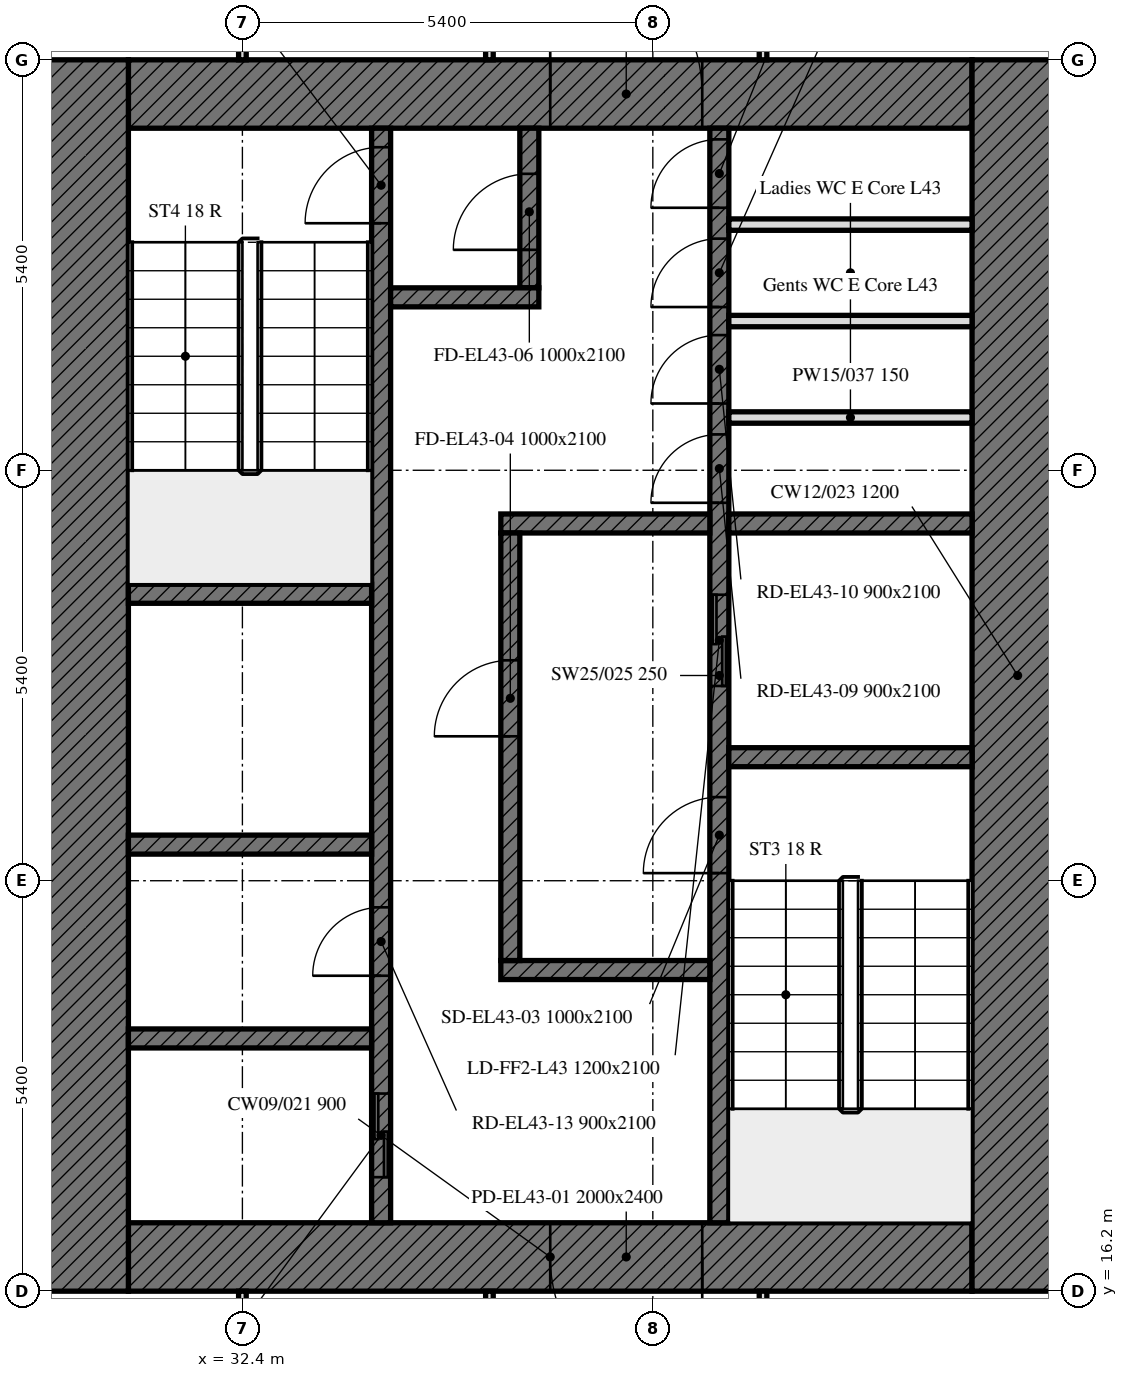
"""IFC4 building model, lengths in metres.
Left out: names, types, materials, properties, quantities, classifications, styles, units other than length and angle.
Written with IfcOpenShell. Run it as: python <this file> out.ifc"""

import sys

from ifc_helpers import new_model, si_unit, direction, frame, frame_2d, origin, place, context, subcontext, project, spatial, rectangle, extrude, element, fill, save


model = new_model("IFC4")
c1 = context("Model", 3, precision=1e-05, world=origin(), true_north=direction((0.0, 1.0)))
c2 = subcontext(c1, "Body", "Model", "MODEL_VIEW")
j1 = project(units=[si_unit("LENGTHUNIT", "METRE"), si_unit("PLANEANGLEUNIT", "RADIAN")], contexts=[c1])
p1 = place(None, origin())
s1 = spatial("IfcSite", under=j1, at=p1, CompositionType="ELEMENT")
p2 = place(p1, origin())
s2 = spatial("IfcBuilding", under=s1, at=p2, CompositionType="ELEMENT")
p3 = place(p2, frame((0.0, 0.0, 180.7)))
s3 = spatial("IfcBuildingStorey", under=s2, at=p3, CompositionType="ELEMENT", Elevation=180.7)
p4 = place(p3, frame((42.0, 16.65, 0.0), z_axis=(0.0, 0.0, 1.0), x_axis=(-1.0, 0.0, 0.0)))
e1 = element("IfcWall", 1, at=p4, inside=s3, PredefinedType="SOLIDWALL", context=c2, shape_type="SweptSolid", body=[
    extrude(rectangle(XDim=11.1, YDim=0.9, at=frame_2d((5.55, 0.0))), origin(), (0.0, 0.0, 1.0), 3.0),
])
p5 = place(p4, frame((3.55, 0.0, 0.0)))
e2 = element("IfcOpeningElement", 2, at=p5, cuts=e1, PredefinedType="OPENING", context=c2, shape_type="SweptSolid", body=[
    extrude(rectangle(XDim=2.0, YDim=2.4, at=frame_2d((1.0, 1.2))), frame((0.0, 0.45, 0.0), z_axis=(0.0, -1.0, 0.0), x_axis=(1.0, 0.0, 0.0)), (0.0, 0.0, 1.0), 0.9),
])
p6 = place(p3, frame((30.9, 31.95, 0.0), z_axis=(0.0, 0.0, 1.0), x_axis=(1.0, 0.0, 0.0)))
e3 = element("IfcWall", 3, at=p6, inside=s3, PredefinedType="SOLIDWALL", context=c2, shape_type="SweptSolid", body=[
    extrude(rectangle(XDim=11.1, YDim=0.9, at=frame_2d((5.55, 0.0))), origin(), (0.0, 0.0, 1.0), 3.0),
])
p7 = place(p6, frame((5.55, 0.0, 0.0)))
e4 = element("IfcOpeningElement", 4, at=p7, cuts=e3, PredefinedType="OPENING", context=c2, shape_type="SweptSolid", body=[
    extrude(rectangle(XDim=2.0, YDim=2.4, at=frame_2d((1.0, 1.2))), frame((0.0, 0.45, 0.0), z_axis=(0.0, -1.0, 0.0), x_axis=(1.0, 0.0, 0.0)), (0.0, 0.0, 1.0), 0.9),
])
for number, where, z_axis, x_axis in (
    (5, (42.6, 32.4, 0.0), (0.0, 0.0, 1.0), (0.0, -1.0, 0.0)),
    (6, (30.3, 16.2, 0.0), (0.0, 0.0, 1.0), (0.0, 1.0, 0.0)),
):
    element("IfcWall", number, at=place(p3, frame(where, z_axis=z_axis, x_axis=x_axis)), inside=s3, PredefinedType="SOLIDWALL", context=c2, shape_type="SweptSolid", body=[
        extrude(rectangle(XDim=16.2, YDim=1.2, at=frame_2d((8.1, 0.0))), origin(), (0.0, 0.0, 1.0), 3.0),
    ])
p8 = place(p3, frame((38.675, 17.1, 0.0), z_axis=(0.0, 0.0, 1.0), x_axis=(0.0, 1.0, 0.0)))
e7 = element("IfcWall", 7, at=p8, inside=s3, PredefinedType="SOLIDWALL", context=c2, shape_type="SweptSolid", body=[
    extrude(rectangle(XDim=14.4, YDim=0.25, at=frame_2d((7.2, 0.0))), origin(), (0.0, 0.0, 1.0), 3.0),
])
p9 = place(p8, frame((4.6, 0.0, 0.0)))
e8 = element("IfcOpeningElement", 8, at=p9, cuts=e7, PredefinedType="OPENING", context=c2, shape_type="SweptSolid", body=[
    extrude(rectangle(XDim=1.0, YDim=2.1, at=frame_2d((0.5, 1.05))), frame((0.0, 0.125, 0.0), z_axis=(0.0, -1.0, 0.0), x_axis=(1.0, 0.0, 0.0)), (0.0, 0.0, 1.0), 0.25),
])
p10 = place(p8, frame((7.062, 0.0, 0.0)))
e9 = element("IfcOpeningElement", 9, at=p10, cuts=e7, PredefinedType="OPENING", context=c2, shape_type="SweptSolid", body=[
    extrude(rectangle(XDim=1.2, YDim=2.1, at=frame_2d((0.6, 1.05))), frame((0.0, 0.125, 0.0), z_axis=(0.0, -1.0, 0.0), x_axis=(1.0, 0.0, 0.0)), (0.0, 0.0, 1.0), 0.25),
])
p11 = place(p8, frame((9.472, 0.0, 0.0)))
e10 = element("IfcOpeningElement", 10, at=p11, cuts=e7, PredefinedType="OPENING", context=c2, shape_type="SweptSolid", body=[
    extrude(rectangle(XDim=0.9, YDim=2.1, at=frame_2d((0.45, 1.05))), frame((0.0, 0.125, 0.0), z_axis=(0.0, -1.0, 0.0), x_axis=(1.0, 0.0, 0.0)), (0.0, 0.0, 1.0), 0.25),
])
p12 = place(p8, frame((10.779, 0.0, 0.0)))
e11 = element("IfcOpeningElement", 11, at=p12, cuts=e7, PredefinedType="OPENING", context=c2, shape_type="SweptSolid", body=[
    extrude(rectangle(XDim=0.9, YDim=2.1, at=frame_2d((0.45, 1.05))), frame((0.0, 0.125, 0.0), z_axis=(0.0, -1.0, 0.0), x_axis=(1.0, 0.0, 0.0)), (0.0, 0.0, 1.0), 0.25),
])
p13 = place(p8, frame((12.048, 0.0, 0.0)))
e12 = element("IfcOpeningElement", 12, at=p13, cuts=e7, PredefinedType="OPENING", context=c2, shape_type="SweptSolid", body=[
    extrude(rectangle(XDim=0.9, YDim=2.1, at=frame_2d((0.45, 1.05))), frame((0.0, 0.125, 0.0), z_axis=(0.0, -1.0, 0.0), x_axis=(1.0, 0.0, 0.0)), (0.0, 0.0, 1.0), 0.25),
])
p14 = place(p8, frame((13.354, 0.0, 0.0)))
e13 = element("IfcOpeningElement", 13, at=p14, cuts=e7, PredefinedType="OPENING", context=c2, shape_type="SweptSolid", body=[
    extrude(rectangle(XDim=0.9, YDim=2.1, at=frame_2d((0.45, 1.05))), frame((0.0, 0.125, 0.0), z_axis=(0.0, -1.0, 0.0), x_axis=(1.0, 0.0, 0.0)), (0.0, 0.0, 1.0), 0.25),
])
p15 = place(p3, frame((34.225, 17.1, 0.0), z_axis=(0.0, 0.0, 1.0), x_axis=(0.0, 1.0, 0.0)))
e14 = element("IfcWall", 14, at=p15, inside=s3, PredefinedType="SOLIDWALL", context=c2, shape_type="SweptSolid", body=[
    extrude(rectangle(XDim=14.4, YDim=0.25, at=frame_2d((7.2, 0.0))), origin(), (0.0, 0.0, 1.0), 3.0),
])
p16 = place(p15, frame((13.15, 0.0, 0.0)))
e15 = element("IfcOpeningElement", 15, at=p16, cuts=e14, PredefinedType="OPENING", context=c2, shape_type="SweptSolid", body=[
    extrude(rectangle(XDim=1.0, YDim=2.1, at=frame_2d((0.5, 1.05))), frame((0.0, 0.125, 0.0), z_axis=(0.0, -1.0, 0.0), x_axis=(1.0, 0.0, 0.0)), (0.0, 0.0, 1.0), 0.25),
])
p17 = place(p15, frame((0.6, 0.0, 0.0)))
e16 = element("IfcOpeningElement", 16, at=p17, cuts=e14, PredefinedType="OPENING", context=c2, shape_type="SweptSolid", body=[
    extrude(rectangle(XDim=1.1, YDim=2.1, at=frame_2d((0.55, 1.05))), frame((0.0, 0.125, 0.0), z_axis=(0.0, -1.0, 0.0), x_axis=(1.0, 0.0, 0.0)), (0.0, 0.0, 1.0), 0.25),
])
p18 = place(p15, frame((3.25, 0.0, 0.0)))
e17 = element("IfcOpeningElement", 17, at=p18, cuts=e14, PredefinedType="OPENING", context=c2, shape_type="SweptSolid", body=[
    extrude(rectangle(XDim=0.9, YDim=2.1, at=frame_2d((0.45, 1.05))), frame((0.0, 0.125, 0.0), z_axis=(0.0, -1.0, 0.0), x_axis=(1.0, 0.0, 0.0)), (0.0, 0.0, 1.0), 0.25),
])
p19 = place(p3, frame((38.8, 23.225, 0.0), z_axis=(0.0, 0.0, 1.0), x_axis=(1.0, 0.0, 0.0)))
e18 = element("IfcWall", 18, at=p19, inside=s3, PredefinedType="SOLIDWALL", context=c2, shape_type="SweptSolid", body=[
    extrude(rectangle(XDim=3.2, YDim=0.25, at=frame_2d((1.6, 0.0))), origin(), (0.0, 0.0, 1.0), 3.0),
])
for number, where, z_axis, x_axis in (
    (19, (30.9, 25.375, 0.0), (0.0, 0.0, 1.0), (1.0, 0.0, 0.0)),
    (20, (30.9, 22.075, 0.0), (0.0, 0.0, 1.0), (1.0, 0.0, 0.0)),
):
    element("IfcWall", number, at=place(p3, frame(where, z_axis=z_axis, x_axis=x_axis)), inside=s3, PredefinedType="SOLIDWALL", context=c2, shape_type="SweptSolid", body=[
        extrude(rectangle(XDim=3.2, YDim=0.25, at=frame_2d((1.6, 0.0))), origin(), (0.0, 0.0, 1.0), 3.0),
    ])
p20 = place(p3, frame((38.8, 26.3, 0.0), z_axis=(0.0, 0.0, 1.0), x_axis=(1.0, 0.0, 0.0)))
e21 = element("IfcWall", 21, at=p20, inside=s3, PredefinedType="SOLIDWALL", context=c2, shape_type="SweptSolid", body=[
    extrude(rectangle(XDim=3.2, YDim=0.25, at=frame_2d((1.6, 0.0))), origin(), (0.0, 0.0, 1.0), 3.0),
])
for number, where, z_axis, x_axis in (
    (22, (35.8, 26.3, 0.0), (0.0, 0.0, 1.0), (1.0, 0.0, 0.0)),
    (23, (35.8, 20.425, 0.0), (0.0, 0.0, 1.0), (1.0, 0.0, 0.0)),
):
    element("IfcWall", number, at=place(p3, frame(where, z_axis=z_axis, x_axis=x_axis)), inside=s3, PredefinedType="SOLIDWALL", context=c2, shape_type="SweptSolid", body=[
        extrude(rectangle(XDim=2.75, YDim=0.25, at=frame_2d((1.375, 0.0))), origin(), (0.0, 0.0, 1.0), 3.0),
    ])
p21 = place(p3, frame((36.175, 29.4, 0.0), z_axis=(0.0, 0.0, 1.0), x_axis=(0.0, 1.0, 0.0)))
e24 = element("IfcWall", 24, at=p21, inside=s3, PredefinedType="SOLIDWALL", context=c2, shape_type="SweptSolid", body=[
    extrude(rectangle(XDim=2.1, YDim=0.25, at=frame_2d((1.05, 0.0))), origin(), (0.0, 0.0, 1.0), 3.0),
])
p22 = place(p21, frame((0.5, 0.0, 0.0)))
e25 = element("IfcOpeningElement", 25, at=p22, cuts=e24, PredefinedType="OPENING", context=c2, shape_type="SweptSolid", body=[
    extrude(rectangle(XDim=1.0, YDim=2.1, at=frame_2d((0.5, 1.05))), frame((0.0, 0.125, 0.0), z_axis=(0.0, -1.0, 0.0), x_axis=(1.0, 0.0, 0.0)), (0.0, 0.0, 1.0), 0.25),
])
p23 = place(p3, frame((34.35, 29.275, 0.0), z_axis=(0.0, 0.0, 1.0), x_axis=(1.0, 0.0, 0.0)))
e26 = element("IfcWall", 26, at=p23, inside=s3, PredefinedType="SOLIDWALL", context=c2, shape_type="SweptSolid", body=[
    extrude(rectangle(XDim=1.95, YDim=0.25, at=frame_2d((0.975, 0.0))), origin(), (0.0, 0.0, 1.0), 3.0),
])
p24 = place(p3, frame((35.925, 20.55, 0.0), z_axis=(0.0, 0.0, 1.0), x_axis=(0.0, 1.0, 0.0)))
e27 = element("IfcWall", 27, at=p24, inside=s3, PredefinedType="SOLIDWALL", context=c2, shape_type="SweptSolid", body=[
    extrude(rectangle(XDim=5.625, YDim=0.25, at=frame_2d((2.812, 0.0))), origin(), (0.0, 0.0, 1.0), 3.0),
])
p25 = place(p24, frame((2.95, 0.0, 0.0)))
e28 = element("IfcOpeningElement", 28, at=p25, cuts=e27, PredefinedType="OPENING", context=c2, shape_type="SweptSolid", body=[
    extrude(rectangle(XDim=1.0, YDim=2.1, at=frame_2d((0.5, 1.05))), frame((0.0, 0.125, 0.0), z_axis=(0.0, -1.0, 0.0), x_axis=(1.0, 0.0, 0.0)), (0.0, 0.0, 1.0), 0.25),
])
p26 = place(p3, frame((30.9, 19.525, 0.0), z_axis=(0.0, 0.0, 1.0), x_axis=(1.0, 0.0, 0.0)))
e29 = element("IfcWall", 29, at=p26, inside=s3, PredefinedType="SOLIDWALL", context=c2, shape_type="SweptSolid", body=[
    extrude(rectangle(XDim=3.2, YDim=0.25, at=frame_2d((1.6, 0.0))), origin(), (0.0, 0.0, 1.0), 3.0),
])
for number, where, z_axis, x_axis in (
    (30, (38.8, 27.694, 0.0), (0.0, 0.0, 1.0), (1.0, 0.0, 0.0)),
    (31, (38.8, 28.963, 0.0), (0.0, 0.0, 1.0), (1.0, 0.0, 0.0)),
    (32, (38.8, 30.232, 0.0), (0.0, 0.0, 1.0), (1.0, 0.0, 0.0)),
):
    element("IfcWall", number, at=place(p3, frame(where, z_axis=z_axis, x_axis=x_axis)), inside=s3, PredefinedType="PARTITIONING", context=c2, shape_type="SweptSolid", body=[
        extrude(rectangle(XDim=3.2, YDim=0.15, at=frame_2d((1.6, 0.0))), origin(), (0.0, 0.0, 1.0), 3.0),
    ])
p27 = place(p3, frame((32.4, 32.4, 0.0), z_axis=(0.0, 0.0, 1.0), x_axis=(0.0, 1.0, 0.0)))
e33 = element("IfcWall", 33, at=p27, inside=s3, PredefinedType="PARTITIONING", context=c2, shape_type="SweptSolid", body=[
    extrude(rectangle(XDim=4.98, YDim=0.1, at=frame_2d((2.49, 0.0))), origin(), (0.0, 0.0, 1.0), 2.4),
])
for number, where, z_axis, x_axis in (
    (34, (39.25, 32.4, 0.0), (0.0, 0.0, 1.0), (0.0, 1.0, 0.0)),
    (35, (35.65, 38.625, 0.0), (0.0, 0.0, 1.0), (0.0, -1.0, 0.0)),
):
    element("IfcWall", number, at=place(p3, frame(where, z_axis=z_axis, x_axis=x_axis)), inside=s3, PredefinedType="PARTITIONING", context=c2, shape_type="SweptSolid", body=[
        extrude(rectangle(XDim=6.225, YDim=0.1, at=frame_2d((3.113, 0.0))), origin(), (0.0, 0.0, 1.0), 2.4),
    ])
for number, where, z_axis, x_axis in (
    (36, (32.4, 13.575, 0.0), (0.0, 0.0, 1.0), (0.0, 1.0, 0.0)),
    (37, (35.65, 16.2, 0.0), (0.0, 0.0, 1.0), (0.0, -1.0, 0.0)),
    (38, (39.25, 13.575, 0.0), (0.0, 0.0, 1.0), (0.0, 1.0, 0.0)),
):
    element("IfcWall", number, at=place(p3, frame(where, z_axis=z_axis, x_axis=x_axis)), inside=s3, PredefinedType="PARTITIONING", context=c2, shape_type="SweptSolid", body=[
        extrude(rectangle(XDim=2.625, YDim=0.1, at=frame_2d((1.312, 0.0))), origin(), (0.0, 0.0, 1.0), 3.0),
    ])
p28 = place(p5, origin())
e39 = element("IfcDoor", 39, at=p28, inside=s3, OperationType="DOUBLE_DOOR_SINGLE_SWING", PredefinedType="DOOR", context=c2, shape_type="SweptSolid", body=[
    extrude(rectangle(XDim=2.0, YDim=2.4, at=frame_2d((1.0, 1.2))), frame((0.0, 0.025, 0.0), z_axis=(0.0, -1.0, 0.0), x_axis=(1.0, 0.0, 0.0)), (0.0, 0.0, 1.0), 0.05),
])
fill(e2, e39)
p29 = place(p7, origin())
e40 = element("IfcDoor", 40, at=p29, inside=s3, OperationType="DOUBLE_DOOR_SINGLE_SWING", PredefinedType="DOOR", context=c2, shape_type="SweptSolid", body=[
    extrude(rectangle(XDim=2.0, YDim=2.4, at=frame_2d((1.0, 1.2))), frame((0.0, 0.025, 0.0), z_axis=(0.0, -1.0, 0.0), x_axis=(1.0, 0.0, 0.0)), (0.0, 0.0, 1.0), 0.05),
])
fill(e4, e40)
p30 = place(p9, origin())
e41 = element("IfcDoor", 41, at=p30, inside=s3, OperationType="SINGLE_SWING_LEFT", PredefinedType="DOOR", context=c2, shape_type="SweptSolid", body=[
    extrude(rectangle(XDim=1.0, YDim=2.1, at=frame_2d((0.5, 1.05))), frame((0.0, 0.025, 0.0), z_axis=(0.0, -1.0, 0.0), x_axis=(1.0, 0.0, 0.0)), (0.0, 0.0, 1.0), 0.05),
])
fill(e8, e41)
p31 = place(p25, origin())
e42 = element("IfcDoor", 42, at=p31, inside=s3, OperationType="SINGLE_SWING_LEFT", PredefinedType="DOOR", context=c2, shape_type="SweptSolid", body=[
    extrude(rectangle(XDim=1.0, YDim=2.1, at=frame_2d((0.5, 1.05))), frame((0.0, 0.025, 0.0), z_axis=(0.0, -1.0, 0.0), x_axis=(1.0, 0.0, 0.0)), (0.0, 0.0, 1.0), 0.05),
])
fill(e28, e42)
p32 = place(p16, origin())
e43 = element("IfcDoor", 43, at=p32, inside=s3, OperationType="SINGLE_SWING_LEFT", PredefinedType="DOOR", context=c2, shape_type="SweptSolid", body=[
    extrude(rectangle(XDim=1.0, YDim=2.1, at=frame_2d((0.5, 1.05))), frame((0.0, 0.025, 0.0), z_axis=(0.0, -1.0, 0.0), x_axis=(1.0, 0.0, 0.0)), (0.0, 0.0, 1.0), 0.05),
])
fill(e15, e43)
p33 = place(p22, origin())
e44 = element("IfcDoor", 44, at=p33, inside=s3, OperationType="SINGLE_SWING_LEFT", PredefinedType="DOOR", context=c2, shape_type="SweptSolid", body=[
    extrude(rectangle(XDim=1.0, YDim=2.1, at=frame_2d((0.5, 1.05))), frame((0.0, 0.025, 0.0), z_axis=(0.0, -1.0, 0.0), x_axis=(1.0, 0.0, 0.0)), (0.0, 0.0, 1.0), 0.05),
])
fill(e25, e44)
p34 = place(p10, origin())
e45 = element("IfcDoor", 45, at=p34, inside=s3, OperationType="DOUBLE_DOOR_SLIDING", PredefinedType="DOOR", context=c2, shape_type="SweptSolid", body=[
    extrude(rectangle(XDim=1.2, YDim=2.1, at=frame_2d((0.6, 1.05))), frame((0.0, 0.025, 0.0), z_axis=(0.0, -1.0, 0.0), x_axis=(1.0, 0.0, 0.0)), (0.0, 0.0, 1.0), 0.05),
])
fill(e9, e45)
p35 = place(p17, origin())
e46 = element("IfcDoor", 46, at=p35, inside=s3, OperationType="DOUBLE_DOOR_SLIDING", PredefinedType="DOOR", context=c2, shape_type="SweptSolid", body=[
    extrude(rectangle(XDim=1.1, YDim=2.1, at=frame_2d((0.55, 1.05))), frame((0.0, 0.025, 0.0), z_axis=(0.0, -1.0, 0.0), x_axis=(1.0, 0.0, 0.0)), (0.0, 0.0, 1.0), 0.05),
])
fill(e16, e46)
p36 = place(p11, origin())
e47 = element("IfcDoor", 47, at=p36, inside=s3, OperationType="SINGLE_SWING_LEFT", PredefinedType="DOOR", context=c2, shape_type="SweptSolid", body=[
    extrude(rectangle(XDim=0.9, YDim=2.1, at=frame_2d((0.45, 1.05))), frame((0.0, 0.025, 0.0), z_axis=(0.0, -1.0, 0.0), x_axis=(1.0, 0.0, 0.0)), (0.0, 0.0, 1.0), 0.05),
])
fill(e10, e47)
p37 = place(p12, origin())
e48 = element("IfcDoor", 48, at=p37, inside=s3, OperationType="SINGLE_SWING_LEFT", PredefinedType="DOOR", context=c2, shape_type="SweptSolid", body=[
    extrude(rectangle(XDim=0.9, YDim=2.1, at=frame_2d((0.45, 1.05))), frame((0.0, 0.025, 0.0), z_axis=(0.0, -1.0, 0.0), x_axis=(1.0, 0.0, 0.0)), (0.0, 0.0, 1.0), 0.05),
])
fill(e11, e48)
p38 = place(p13, origin())
e49 = element("IfcDoor", 49, at=p38, inside=s3, OperationType="SINGLE_SWING_LEFT", PredefinedType="DOOR", context=c2, shape_type="SweptSolid", body=[
    extrude(rectangle(XDim=0.9, YDim=2.1, at=frame_2d((0.45, 1.05))), frame((0.0, 0.025, 0.0), z_axis=(0.0, -1.0, 0.0), x_axis=(1.0, 0.0, 0.0)), (0.0, 0.0, 1.0), 0.05),
])
fill(e12, e49)
p39 = place(p14, origin())
e50 = element("IfcDoor", 50, at=p39, inside=s3, OperationType="SINGLE_SWING_LEFT", PredefinedType="DOOR", context=c2, shape_type="SweptSolid", body=[
    extrude(rectangle(XDim=0.9, YDim=2.1, at=frame_2d((0.45, 1.05))), frame((0.0, 0.025, 0.0), z_axis=(0.0, -1.0, 0.0), x_axis=(1.0, 0.0, 0.0)), (0.0, 0.0, 1.0), 0.05),
])
fill(e13, e50)
p40 = place(p18, origin())
e51 = element("IfcDoor", 51, at=p40, inside=s3, OperationType="SINGLE_SWING_LEFT", PredefinedType="DOOR", context=c2, shape_type="SweptSolid", body=[
    extrude(rectangle(XDim=0.9, YDim=2.1, at=frame_2d((0.45, 1.05))), frame((0.0, 0.025, 0.0), z_axis=(0.0, -1.0, 0.0), x_axis=(1.0, 0.0, 0.0)), (0.0, 0.0, 1.0), 0.05),
])
fill(e17, e51)
save(model, sys.argv[1])
